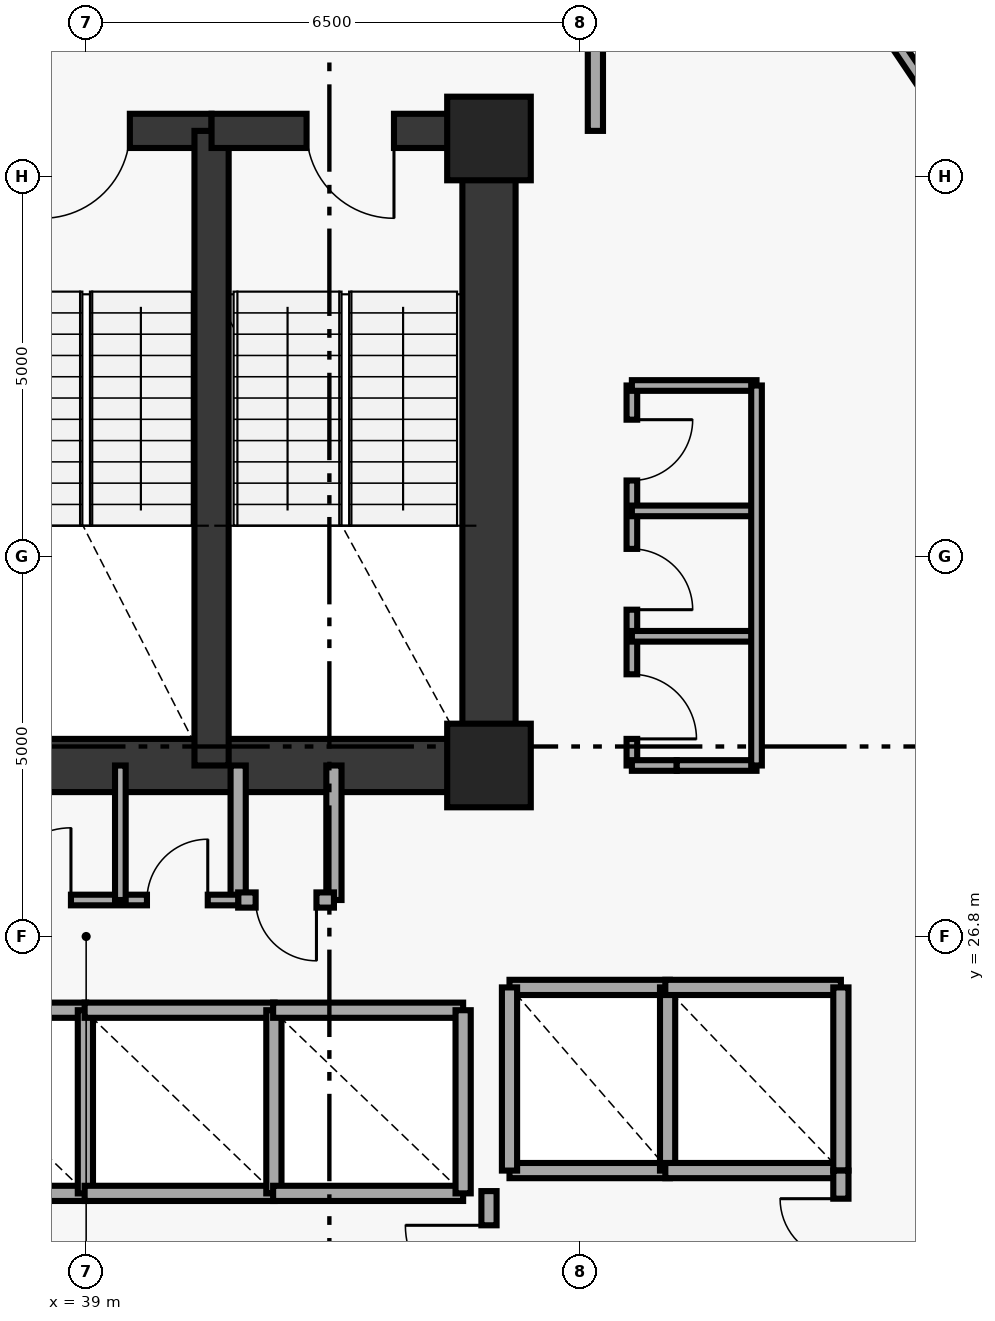
"""IFC4 building model, lengths in metres.
Left out: names, types, materials, properties, quantities, classifications, styles, units other than length and angle.
Written with IfcOpenShell. Run it as: python <this file> out.ifc"""

import sys

from ifc_helpers import new_model, si_unit, direction, frame, frame_2d, origin, origin_2d, place, context, subcontext, project, spatial, rectangle, extrude, element, fill, save


model = new_model("IFC4")
c1 = context("Model", 3, precision=1e-05, world=origin(), true_north=direction((0.0, 1.0)))
c2 = subcontext(c1, "Body", "Model", "MODEL_VIEW")
j1 = project(units=[si_unit("LENGTHUNIT", "METRE"), si_unit("PLANEANGLEUNIT", "RADIAN")], contexts=[c1])
p1 = place(None, origin())
s1 = spatial("IfcSite", under=j1, at=p1, CompositionType="ELEMENT")
p2 = place(p1, origin())
s2 = spatial("IfcBuilding", under=s1, at=p2, CompositionType="ELEMENT")
p3 = place(p2, frame((0.0, 0.0, 102.0)))
s3 = spatial("IfcBuildingStorey", under=s2, at=p3, CompositionType="ELEMENT", Elevation=102.0)
for number, where, z_axis, x_axis in (
    (1, (44.3, 29.05, 0.0), (0.0, 0.0, 1.0), (1.0, 0.0, 0.0)),
    (2, (44.3, 37.3, 0.0), (0.0, 0.0, 1.0), (1.0, 0.0, 0.0)),
):
    element("IfcColumn", number, at=place(p3, frame(where, z_axis=z_axis, x_axis=x_axis)), inside=s3, PredefinedType="PILASTER", context=c2, shape_type="SweptSolid", body=[
        extrude(rectangle(XDim=1.1, YDim=1.1, at=origin_2d()), origin(), (0.0, 0.0, 1.0), 3.7),
    ])
p4 = place(p3, frame((44.3, 29.05, 0.0), z_axis=(0.0, 0.0, 1.0), x_axis=(0.0, 1.0, 0.0)))
e3 = element("IfcWall", 3, at=p4, inside=s3, PredefinedType="SHEAR", context=c2, shape_type="SweptSolid", body=[
    extrude(rectangle(XDim=8.35, YDim=0.7, at=frame_2d((4.175, 0.0))), origin(), (0.0, 0.0, 1.0), 3.7),
])
p5 = place(p3, frame((33.7, 29.05, 0.0), z_axis=(0.0, 0.0, 1.0), x_axis=(1.0, 0.0, 0.0)))
e4 = element("IfcWall", 4, at=p5, inside=s3, PredefinedType="SHEAR", context=c2, shape_type="SweptSolid", body=[
    extrude(rectangle(XDim=10.6, YDim=0.7, at=frame_2d((5.3, 0.0))), origin(), (0.0, 0.0, 1.0), 3.7),
])
p6 = place(p3, frame((40.65, 37.4, 0.0), z_axis=(0.0, 0.0, 1.0), x_axis=(-1.0, 0.0, 0.0)))
e5 = element("IfcWall", 5, at=p6, inside=s3, PredefinedType="SHEAR", context=c2, shape_type="SweptSolid", body=[
    extrude(rectangle(XDim=3.3, YDim=0.45, at=frame_2d((1.65, 0.0))), origin(), (0.0, 0.0, 1.0), 3.7),
])
p7 = place(p6, frame((1.075, 0.0, 0.0)))
e6 = element("IfcOpeningElement", 6, at=p7, cuts=e5, PredefinedType="OPENING", context=c2, shape_type="SweptSolid", body=[
    extrude(rectangle(XDim=1.15, YDim=2.15, at=frame_2d((0.575, 1.075))), frame((0.0, 0.235, 0.0), z_axis=(0.0, -1.0, 0.0), x_axis=(1.0, 0.0, 0.0)), (0.0, 0.0, 1.0), 0.47),
])
p8 = place(p3, frame((40.65, 29.05, 0.0), z_axis=(0.0, 0.0, 1.0), x_axis=(0.0, 1.0, 0.0)))
e7 = element("IfcWall", 7, at=p8, inside=s3, PredefinedType="SHEAR", context=c2, shape_type="SweptSolid", body=[
    extrude(rectangle(XDim=8.35, YDim=0.45, at=frame_2d((4.175, 0.0))), origin(), (0.0, 0.0, 1.0), 3.7),
])
p9 = place(p3, frame((44.3, 37.4, 0.0), z_axis=(0.0, 0.0, 1.0), x_axis=(-1.0, 0.0, 0.0)))
e8 = element("IfcWall", 8, at=p9, inside=s3, PredefinedType="SHEAR", context=c2, shape_type="SweptSolid", body=[
    extrude(rectangle(XDim=3.65, YDim=0.45, at=frame_2d((1.825, 0.0))), origin(), (0.0, 0.0, 1.0), 3.7),
])
p10 = place(p9, frame((1.25, 0.0, 0.0)))
e9 = element("IfcOpeningElement", 9, at=p10, cuts=e8, PredefinedType="OPENING", context=c2, shape_type="SweptSolid", body=[
    extrude(rectangle(XDim=1.15, YDim=2.15, at=frame_2d((0.575, 1.075))), frame((0.0, 0.235, 0.0), z_axis=(0.0, -1.0, 0.0), x_axis=(1.0, 0.0, 0.0)), (0.0, 0.0, 1.0), 0.47),
])
p11 = place(p3, frame((45.7, 37.4, 0.0), z_axis=(0.0, 0.0, 1.0), x_axis=(0.0, 1.0, 0.0)))
e10 = element("IfcWall", 10, at=p11, inside=s3, PredefinedType="SOLIDWALL", context=c2, shape_type="SweptSolid", body=[
    extrude(rectangle(XDim=1.88, YDim=0.2, at=frame_2d((0.94, 0.0))), origin(), (0.0, 0.0, 1.0), 3.7),
])
for number, where, z_axis, x_axis in (
    (11, (41.0, 27.28, 0.0), (0.0, 0.0, 1.0), (0.0, 1.0, 0.0)),
    (12, (42.26, 27.28, 0.0), (0.0, 0.0, 1.0), (0.0, 1.0, 0.0)),
):
    element("IfcWall", number, at=place(p3, frame(where, z_axis=z_axis, x_axis=x_axis)), inside=s3, PredefinedType="SOLIDWALL", context=c2, shape_type="SweptSolid", body=[
        extrude(rectangle(XDim=1.77, YDim=0.2, at=frame_2d((0.885, 0.0))), origin(), (0.0, 0.0, 1.0), 3.7),
    ])
p12 = place(p3, frame((41.0, 27.28, 0.0), z_axis=(0.0, 0.0, 1.0), x_axis=(1.0, 0.0, 0.0)))
e13 = element("IfcWall", 13, at=p12, inside=s3, PredefinedType="SOLIDWALL", context=c2, shape_type="SweptSolid", body=[
    extrude(rectangle(XDim=1.26, YDim=0.2, at=frame_2d((0.63, 0.0))), origin(), (0.0, 0.0, 1.0), 3.7),
])
p13 = place(p12, frame((0.23, 0.0, 0.0)))
e14 = element("IfcOpeningElement", 14, at=p13, cuts=e13, PredefinedType="OPENING", context=c2, shape_type="SweptSolid", body=[
    extrude(rectangle(XDim=0.8, YDim=2.05, at=frame_2d((0.4, 1.025))), frame((0.0, 0.11, 0.0), z_axis=(0.0, -1.0, 0.0), x_axis=(1.0, 0.0, 0.0)), (0.0, 0.0, 1.0), 0.22),
])
for number, where, z_axis, x_axis in (
    (15, (44.57, 23.72, 0.0), (0.0, 0.0, 1.0), (1.0, 0.0, 0.0)),
    (16, (44.57, 26.13, 0.0), (0.0, 0.0, 1.0), (1.0, 0.0, 0.0)),
):
    element("IfcWall", number, at=place(p3, frame(where, z_axis=z_axis, x_axis=x_axis)), inside=s3, PredefinedType="SOLIDWALL", context=c2, shape_type="SweptSolid", body=[
        extrude(rectangle(XDim=2.11, YDim=0.2, at=frame_2d((1.055, 0.0))), origin(), (0.0, 0.0, 1.0), 3.7),
    ])
for number, where, z_axis, x_axis in (
    (17, (44.57, 23.72, 0.0), (0.0, 0.0, 1.0), (0.0, 1.0, 0.0)),
    (18, (46.65, 23.72, 0.0), (0.0, 0.0, 1.0), (0.0, 1.0, 0.0)),
):
    element("IfcWall", number, at=place(p3, frame(where, z_axis=z_axis, x_axis=x_axis)), inside=s3, PredefinedType="SOLIDWALL", context=c2, shape_type="SweptSolid", body=[
        extrude(rectangle(XDim=2.41, YDim=0.2, at=frame_2d((1.205, 0.0))), origin(), (0.0, 0.0, 1.0), 3.7),
    ])
for number, where, z_axis, x_axis in (
    (19, (46.62, 23.72, 0.0), (0.0, 0.0, 1.0), (1.0, 0.0, 0.0)),
    (20, (46.62, 26.13, 0.0), (0.0, 0.0, 1.0), (1.0, 0.0, 0.0)),
):
    element("IfcWall", number, at=place(p3, frame(where, z_axis=z_axis, x_axis=x_axis)), inside=s3, PredefinedType="SOLIDWALL", context=c2, shape_type="SweptSolid", body=[
        extrude(rectangle(XDim=2.31, YDim=0.2, at=frame_2d((1.155, 0.0))), origin(), (0.0, 0.0, 1.0), 3.7),
    ])
p14 = place(p3, frame((48.93, 23.72, 0.0), z_axis=(0.0, 0.0, 1.0), x_axis=(0.0, 1.0, 0.0)))
e21 = element("IfcWall", 21, at=p14, inside=s3, PredefinedType="SOLIDWALL", context=c2, shape_type="SweptSolid", body=[
    extrude(rectangle(XDim=2.41, YDim=0.2, at=frame_2d((1.205, 0.0))), origin(), (0.0, 0.0, 1.0), 3.7),
])
for number, where, z_axis, x_axis in (
    (22, (36.5, 23.42, 0.0), (0.0, 0.0, 1.0), (1.0, 0.0, 0.0)),
    (23, (36.5, 25.83, 0.0), (0.0, 0.0, 1.0), (1.0, 0.0, 0.0)),
):
    element("IfcWall", number, at=place(p3, frame(where, z_axis=z_axis, x_axis=x_axis)), inside=s3, PredefinedType="SOLIDWALL", context=c2, shape_type="SweptSolid", body=[
        extrude(rectangle(XDim=2.5, YDim=0.2, at=frame_2d((1.25, 0.0))), origin(), (0.0, 0.0, 1.0), 3.7),
    ])
p15 = place(p3, frame((38.99, 23.42, 0.0), z_axis=(0.0, 0.0, 1.0), x_axis=(0.0, 1.0, 0.0)))
e24 = element("IfcWall", 24, at=p15, inside=s3, PredefinedType="SOLIDWALL", context=c2, shape_type="SweptSolid", body=[
    extrude(rectangle(XDim=2.41, YDim=0.2, at=frame_2d((1.205, 0.0))), origin(), (0.0, 0.0, 1.0), 3.7),
])
for number, where, z_axis, x_axis in (
    (25, (38.98, 23.42, 0.0), (0.0, 0.0, 1.0), (1.0, 0.0, 0.0)),
    (26, (38.98, 25.83, 0.0), (0.0, 0.0, 1.0), (1.0, 0.0, 0.0)),
):
    element("IfcWall", number, at=place(p3, frame(where, z_axis=z_axis, x_axis=x_axis)), inside=s3, PredefinedType="SOLIDWALL", context=c2, shape_type="SweptSolid", body=[
        extrude(rectangle(XDim=2.5, YDim=0.2, at=frame_2d((1.25, 0.0))), origin(), (0.0, 0.0, 1.0), 3.7),
    ])
p16 = place(p3, frame((41.47, 23.42, 0.0), z_axis=(0.0, 0.0, 1.0), x_axis=(0.0, 1.0, 0.0)))
e27 = element("IfcWall", 27, at=p16, inside=s3, PredefinedType="SOLIDWALL", context=c2, shape_type="SweptSolid", body=[
    extrude(rectangle(XDim=2.41, YDim=0.2, at=frame_2d((1.205, 0.0))), origin(), (0.0, 0.0, 1.0), 3.7),
])
for number, where, z_axis, x_axis in (
    (28, (41.46, 23.42, 0.0), (0.0, 0.0, 1.0), (1.0, 0.0, 0.0)),
    (29, (41.46, 25.83, 0.0), (0.0, 0.0, 1.0), (1.0, 0.0, 0.0)),
):
    element("IfcWall", number, at=place(p3, frame(where, z_axis=z_axis, x_axis=x_axis)), inside=s3, PredefinedType="SOLIDWALL", context=c2, shape_type="SweptSolid", body=[
        extrude(rectangle(XDim=2.5, YDim=0.2, at=frame_2d((1.25, 0.0))), origin(), (0.0, 0.0, 1.0), 3.7),
    ])
p17 = place(p3, frame((43.96, 23.42, 0.0), z_axis=(0.0, 0.0, 1.0), x_axis=(0.0, 1.0, 0.0)))
e30 = element("IfcWall", 30, at=p17, inside=s3, PredefinedType="SOLIDWALL", context=c2, shape_type="SweptSolid", body=[
    extrude(rectangle(XDim=2.41, YDim=0.2, at=frame_2d((1.205, 0.0))), origin(), (0.0, 0.0, 1.0), 3.7),
])
p18 = place(p3, frame((48.93, 21.38, 0.0), z_axis=(0.0, 0.0, 1.0), x_axis=(0.0, 1.0, 0.0)))
e31 = element("IfcWall", 31, at=p18, inside=s3, PredefinedType="SOLIDWALL", context=c2, shape_type="SweptSolid", body=[
    extrude(rectangle(XDim=2.34, YDim=0.2, at=frame_2d((1.17, 0.0))), origin(), (0.0, 0.0, 1.0), 3.7),
])
p19 = place(p18, frame((0.37, 0.0, 0.0)))
e32 = element("IfcOpeningElement", 32, at=p19, cuts=e31, PredefinedType="OPENING", context=c2, shape_type="SweptSolid", body=[
    extrude(rectangle(XDim=1.6, YDim=2.2, at=frame_2d((0.8, 1.1))), frame((0.0, 0.11, 0.0), z_axis=(0.0, -1.0, 0.0), x_axis=(1.0, 0.0, 0.0)), (0.0, 0.0, 1.0), 0.22),
])
p20 = place(p3, frame((44.3, 21.35, 0.0), z_axis=(0.0, 0.0, 1.0), x_axis=(0.0, 1.0, 0.0)))
e33 = element("IfcWall", 33, at=p20, inside=s3, PredefinedType="SOLIDWALL", context=c2, shape_type="SweptSolid", body=[
    extrude(rectangle(XDim=2.1, YDim=0.2, at=frame_2d((1.05, 0.0))), origin(), (0.0, 0.0, 1.0), 2.92),
])
p21 = place(p20, frame((0.55, 0.0, 0.0)))
e34 = element("IfcOpeningElement", 34, at=p21, cuts=e33, PredefinedType="OPENING", context=c2, shape_type="SweptSolid", body=[
    extrude(rectangle(XDim=1.1, YDim=2.15, at=frame_2d((0.55, 1.075))), frame((0.0, 0.11, 0.0), z_axis=(0.0, -1.0, 0.0), x_axis=(1.0, 0.0, 0.0)), (0.0, 0.0, 1.0), 0.22),
])
p22 = place(p3, frame((35.6, 27.28, 0.0), z_axis=(0.0, 0.0, 1.0), x_axis=(1.0, 0.0, 0.0)))
e35 = element("IfcWall", 35, at=p22, inside=s3, PredefinedType="PARTITIONING", context=c2, shape_type="SweptSolid", body=[
    extrude(rectangle(XDim=5.4, YDim=0.14, at=frame_2d((2.7, 0.0))), origin(), (0.0, 0.0, 1.0), 3.7),
])
p23 = place(p22, frame((0.4, 0.0, 0.0)))
e36 = element("IfcOpeningElement", 36, at=p23, cuts=e35, PredefinedType="OPENING", context=c2, shape_type="SweptSolid", body=[
    extrude(rectangle(XDim=0.85, YDim=2.1, at=frame_2d((0.425, 1.05))), frame((0.0, 0.08, 0.0), z_axis=(0.0, -1.0, 0.0), x_axis=(1.0, 0.0, 0.0)), (0.0, 0.0, 1.0), 0.16),
])
p24 = place(p22, frame((2.25, 0.0, 0.0)))
e37 = element("IfcOpeningElement", 37, at=p24, cuts=e35, PredefinedType="OPENING", context=c2, shape_type="SweptSolid", body=[
    extrude(rectangle(XDim=0.95, YDim=2.1, at=frame_2d((0.475, 1.05))), frame((0.0, 0.08, 0.0), z_axis=(0.0, -1.0, 0.0), x_axis=(1.0, 0.0, 0.0)), (0.0, 0.0, 1.0), 0.16),
])
p25 = place(p22, frame((4.2, 0.0, 0.0)))
e38 = element("IfcOpeningElement", 38, at=p25, cuts=e35, PredefinedType="OPENING", context=c2, shape_type="SweptSolid", body=[
    extrude(rectangle(XDim=0.8, YDim=2.05, at=frame_2d((0.4, 1.025))), frame((0.0, 0.08, 0.0), z_axis=(0.0, -1.0, 0.0), x_axis=(1.0, 0.0, 0.0)), (0.0, 0.0, 1.0), 0.16),
])
p26 = place(p3, frame((39.45, 27.28, 0.0), z_axis=(0.0, 0.0, 1.0), x_axis=(0.0, 1.0, 0.0)))
e39 = element("IfcWall", 39, at=p26, inside=s3, PredefinedType="PARTITIONING", context=c2, shape_type="SweptSolid", body=[
    extrude(rectangle(XDim=1.77, YDim=0.14, at=frame_2d((0.885, 0.0))), origin(), (0.0, 0.0, 1.0), 3.7),
])
p27 = place(p3, frame((46.18, 34.05, 0.0), z_axis=(0.0, 0.0, 1.0), x_axis=(0.0, -1.0, 0.0)))
e40 = element("IfcWall", 40, at=p27, inside=s3, PredefinedType="PARTITIONING", context=c2, shape_type="SweptSolid", body=[
    extrude(rectangle(XDim=5.0, YDim=0.14, at=frame_2d((2.5, 0.0))), origin(), (0.0, 0.0, 1.0), 3.7),
])
p28 = place(p27, frame((3.8, 0.0, 0.0)))
e41 = element("IfcOpeningElement", 41, at=p28, cuts=e40, PredefinedType="OPENING", context=c2, shape_type="SweptSolid", body=[
    extrude(rectangle(XDim=0.85, YDim=2.1, at=frame_2d((0.425, 1.05))), frame((0.0, 0.08, 0.0), z_axis=(0.0, -1.0, 0.0), x_axis=(1.0, 0.0, 0.0)), (0.0, 0.0, 1.0), 0.16),
])
p29 = place(p27, frame((2.15, 0.0, 0.0)))
e42 = element("IfcOpeningElement", 42, at=p29, cuts=e40, PredefinedType="OPENING", context=c2, shape_type="SweptSolid", body=[
    extrude(rectangle(XDim=0.8, YDim=2.05, at=frame_2d((0.4, 1.025))), frame((0.0, 0.08, 0.0), z_axis=(0.0, -1.0, 0.0), x_axis=(1.0, 0.0, 0.0)), (0.0, 0.0, 1.0), 0.16),
])
p30 = place(p27, frame((0.45, 0.0, 0.0)))
e43 = element("IfcOpeningElement", 43, at=p30, cuts=e40, PredefinedType="OPENING", context=c2, shape_type="SweptSolid", body=[
    extrude(rectangle(XDim=0.8, YDim=2.05, at=frame_2d((0.4, 1.025))), frame((0.0, 0.08, 0.0), z_axis=(0.0, -1.0, 0.0), x_axis=(1.0, 0.0, 0.0)), (0.0, 0.0, 1.0), 0.16),
])
p31 = place(p3, frame((46.18, 29.05, 0.0), z_axis=(0.0, 0.0, 1.0), x_axis=(1.0, 0.0, 0.0)))
e44 = element("IfcWall", 44, at=p31, inside=s3, PredefinedType="PARTITIONING", context=c2, shape_type="SweptSolid", body=[
    extrude(rectangle(XDim=0.59, YDim=0.14, at=frame_2d((0.295, 0.0))), origin(), (0.0, 0.0, 1.0), 2.66),
])
p32 = place(p3, frame((46.77, 29.05, 0.0), z_axis=(0.0, 0.0, 1.0), x_axis=(1.0, 0.0, 0.0)))
e45 = element("IfcWall", 45, at=p32, inside=s3, PredefinedType="PARTITIONING", context=c2, shape_type="SweptSolid", body=[
    extrude(rectangle(XDim=1.05, YDim=0.14, at=frame_2d((0.525, 0.0))), origin(), (0.0, 0.0, 1.0), 3.7),
])
for number, where, z_axis, x_axis in (
    (46, (46.18, 30.75, 0.0), (0.0, 0.0, 1.0), (1.0, 0.0, 0.0)),
    (47, (46.18, 32.4, 0.0), (0.0, 0.0, 1.0), (1.0, 0.0, 0.0)),
    (48, (46.18, 34.05, 0.0), (0.0, 0.0, 1.0), (1.0, 0.0, 0.0)),
):
    element("IfcWall", number, at=place(p3, frame(where, z_axis=z_axis, x_axis=x_axis)), inside=s3, PredefinedType="PARTITIONING", context=c2, shape_type="SweptSolid", body=[
        extrude(rectangle(XDim=1.64, YDim=0.14, at=frame_2d((0.82, 0.0))), origin(), (0.0, 0.0, 1.0), 3.7),
    ])
p33 = place(p3, frame((47.82, 29.05, 0.0), z_axis=(0.0, 0.0, 1.0), x_axis=(0.0, 1.0, 0.0)))
e49 = element("IfcWall", 49, at=p33, inside=s3, PredefinedType="PARTITIONING", context=c2, shape_type="SweptSolid", body=[
    extrude(rectangle(XDim=5.0, YDim=0.14, at=frame_2d((2.5, 0.0))), origin(), (0.0, 0.0, 1.0), 3.7),
])
p34 = place(p3, frame((51.869, 35.27, 0.0), z_axis=(0.0, 0.0, 1.0), x_axis=(-0.558319056182, 0.829626320402, 0.0)))
e50 = element("IfcWall", 50, at=p34, inside=s3, PredefinedType="PARTITIONING", context=c2, shape_type="SweptSolid", body=[
    extrude(rectangle(XDim=4.229, YDim=0.16, at=frame_2d((2.114, 0.0))), origin(), (0.0, 0.0, 1.0), 3.7),
])
p35 = place(p7, origin())
e51 = element("IfcDoor", 51, at=p35, inside=s3, OperationType="SINGLE_SWING_RIGHT", PredefinedType="DOOR", context=c2, shape_type="SweptSolid", body=[
    extrude(rectangle(XDim=1.15, YDim=2.15, at=frame_2d((0.575, 1.075))), frame((0.0, 0.025, 0.0), z_axis=(0.0, -1.0, 0.0), x_axis=(1.0, 0.0, 0.0)), (0.0, 0.0, 1.0), 0.05),
])
fill(e6, e51)
p36 = place(p10, origin())
e52 = element("IfcDoor", 52, at=p36, inside=s3, OperationType="SINGLE_SWING_LEFT", PredefinedType="DOOR", context=c2, shape_type="SweptSolid", body=[
    extrude(rectangle(XDim=1.15, YDim=2.15, at=frame_2d((0.575, 1.075))), frame((0.0, 0.025, 0.0), z_axis=(0.0, -1.0, 0.0), x_axis=(1.0, 0.0, 0.0)), (0.0, 0.0, 1.0), 0.05),
])
fill(e9, e52)
p37 = place(p13, origin())
e53 = element("IfcDoor", 53, at=p37, inside=s3, OperationType="SINGLE_SWING_RIGHT", PredefinedType="DOOR", context=c2, shape_type="SweptSolid", body=[
    extrude(rectangle(XDim=0.8, YDim=2.05, at=frame_2d((0.4, 1.025))), frame((0.0, 0.025, 0.0), z_axis=(0.0, -1.0, 0.0), x_axis=(1.0, 0.0, 0.0)), (0.0, 0.0, 1.0), 0.05),
])
fill(e14, e53)
p38 = place(p19, origin())
e54 = element("IfcDoor", 54, at=p38, inside=s3, OperationType="DOUBLE_DOOR_SINGLE_SWING", PredefinedType="DOOR", context=c2, shape_type="SweptSolid", body=[
    extrude(rectangle(XDim=1.6, YDim=2.2, at=frame_2d((0.8, 1.1))), frame((0.0, 0.025, 0.0), z_axis=(0.0, -1.0, 0.0), x_axis=(1.0, 0.0, 0.0)), (0.0, 0.0, 1.0), 0.05),
])
fill(e32, e54)
p39 = place(p21, origin())
e55 = element("IfcDoor", 55, at=p39, inside=s3, OperationType="SINGLE_SWING_RIGHT", PredefinedType="DOOR", context=c2, shape_type="SweptSolid", body=[
    extrude(rectangle(XDim=1.1, YDim=2.15, at=frame_2d((0.55, 1.075))), frame((0.0, 0.025, 0.0), z_axis=(0.0, -1.0, 0.0), x_axis=(1.0, 0.0, 0.0)), (0.0, 0.0, 1.0), 0.05),
])
fill(e34, e55)
p40 = place(p24, origin())
e56 = element("IfcDoor", 56, at=p40, inside=s3, OperationType="SINGLE_SWING_RIGHT", PredefinedType="DOOR", context=c2, shape_type="SweptSolid", body=[
    extrude(rectangle(XDim=0.95, YDim=2.1, at=frame_2d((0.475, 1.05))), frame((0.0, 0.025, 0.0), z_axis=(0.0, -1.0, 0.0), x_axis=(1.0, 0.0, 0.0)), (0.0, 0.0, 1.0), 0.05),
])
fill(e37, e56)
p41 = place(p25, origin())
e57 = element("IfcDoor", 57, at=p41, inside=s3, OperationType="SINGLE_SWING_RIGHT", PredefinedType="DOOR", context=c2, shape_type="SweptSolid", body=[
    extrude(rectangle(XDim=0.8, YDim=2.05, at=frame_2d((0.4, 1.025))), frame((0.0, 0.025, 0.0), z_axis=(0.0, -1.0, 0.0), x_axis=(1.0, 0.0, 0.0)), (0.0, 0.0, 1.0), 0.05),
])
fill(e38, e57)
p42 = place(p28, origin())
e58 = element("IfcDoor", 58, at=p42, inside=s3, OperationType="SINGLE_SWING_RIGHT", PredefinedType="DOOR", context=c2, shape_type="SweptSolid", body=[
    extrude(rectangle(XDim=0.85, YDim=2.1, at=frame_2d((0.425, 1.05))), frame((0.0, 0.025, 0.0), z_axis=(0.0, -1.0, 0.0), x_axis=(1.0, 0.0, 0.0)), (0.0, 0.0, 1.0), 0.05),
])
fill(e41, e58)
p43 = place(p29, origin())
e59 = element("IfcDoor", 59, at=p43, inside=s3, OperationType="SINGLE_SWING_RIGHT", PredefinedType="DOOR", context=c2, shape_type="SweptSolid", body=[
    extrude(rectangle(XDim=0.8, YDim=2.05, at=frame_2d((0.4, 1.025))), frame((0.0, 0.025, 0.0), z_axis=(0.0, -1.0, 0.0), x_axis=(1.0, 0.0, 0.0)), (0.0, 0.0, 1.0), 0.05),
])
fill(e42, e59)
p44 = place(p30, origin())
e60 = element("IfcDoor", 60, at=p44, inside=s3, OperationType="SINGLE_SWING_LEFT", PredefinedType="DOOR", context=c2, shape_type="SweptSolid", body=[
    extrude(rectangle(XDim=0.8, YDim=2.05, at=frame_2d((0.4, 1.025))), frame((0.0, 0.025, 0.0), z_axis=(0.0, -1.0, 0.0), x_axis=(1.0, 0.0, 0.0)), (0.0, 0.0, 1.0), 0.05),
])
fill(e43, e60)
save(model, sys.argv[1])
